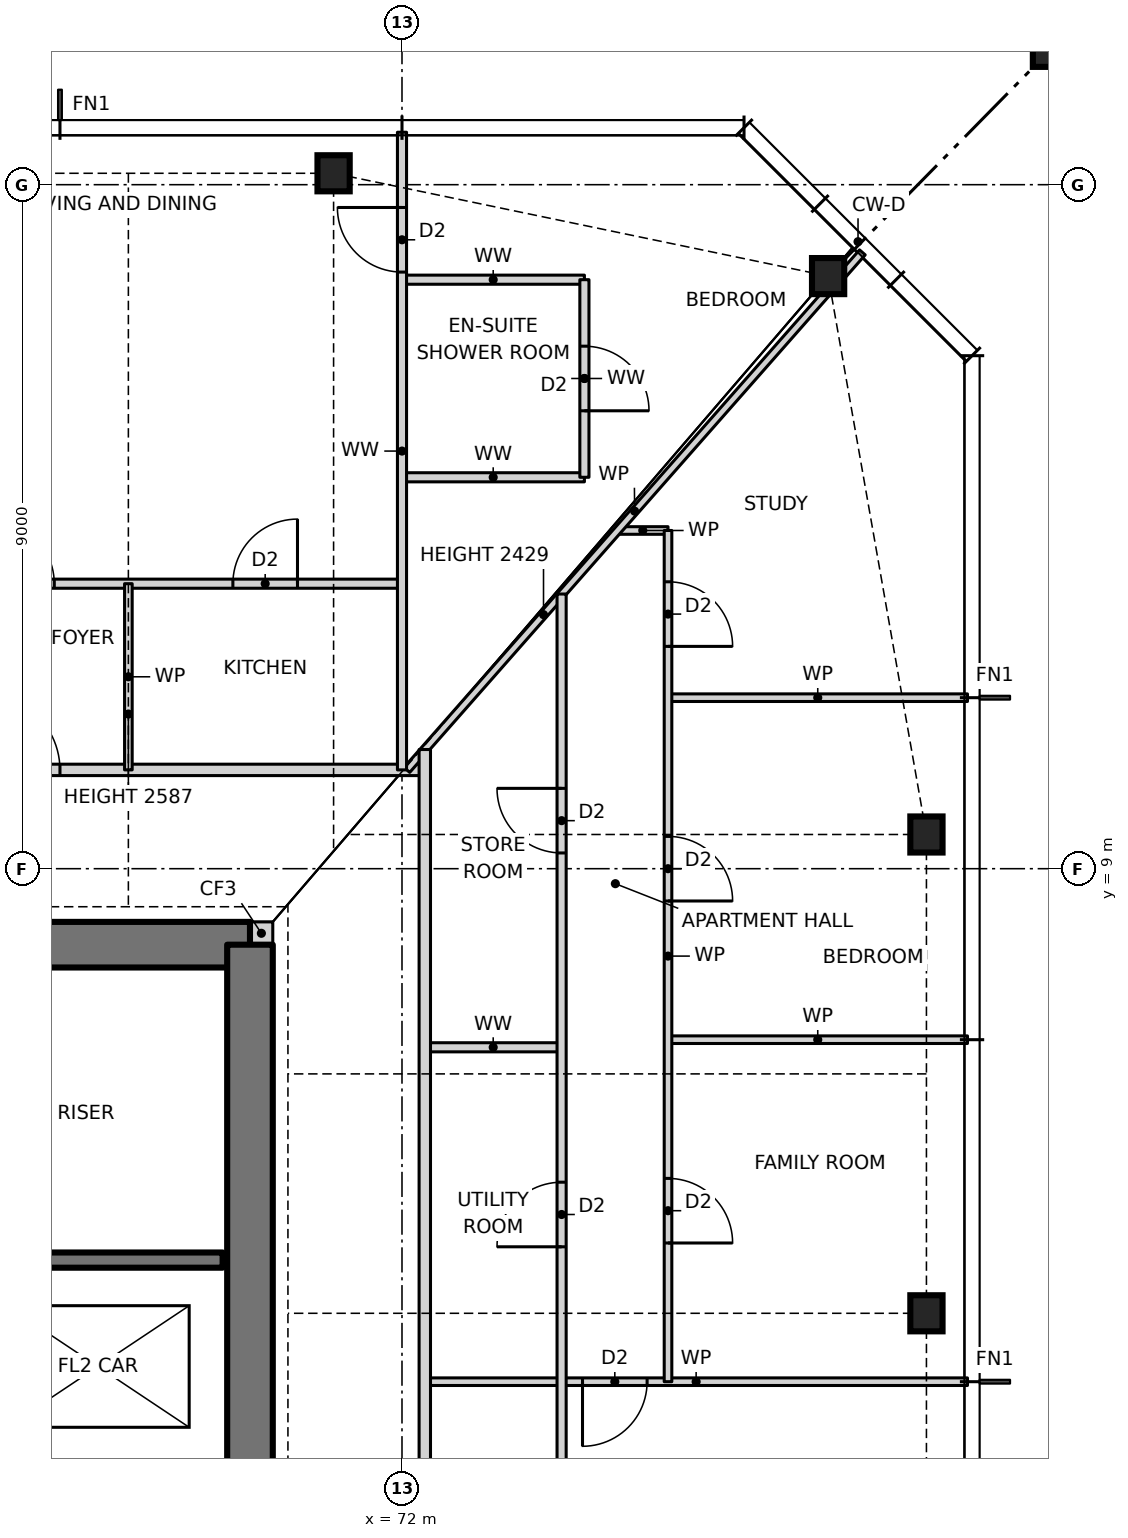
"""IFC4 building model, lengths in metres.
Left out: names, types, materials, properties, quantities, classifications, styles, units other than length and angle.
Written with IfcOpenShell. Run it as: python <this file> out.ifc"""

import sys

from ifc_helpers import new_model, si_unit, direction, frame, frame_2d, origin, origin_2d, place, context, subcontext, project, spatial, rectangle, hollow_rectangle, i_section, extrude, element, fill, save


model = new_model("IFC4")
c1 = context("Model", 3, precision=1e-05, world=origin(), true_north=direction((0.0, 1.0)))
c2 = subcontext(c1, "Body", "Model", "MODEL_VIEW")
j1 = project(units=[si_unit("LENGTHUNIT", "METRE"), si_unit("PLANEANGLEUNIT", "RADIAN")], contexts=[c1])
p1 = place(None, origin())
s1 = spatial("IfcSite", under=j1, at=p1, CompositionType="ELEMENT")
p2 = place(p1, origin())
s2 = spatial("IfcBuilding", under=s1, at=p2, CompositionType="ELEMENT")
p3 = place(p2, frame((0.0, 0.0, 64.0)))
s3 = spatial("IfcBuildingStorey", under=s2, at=p3, CompositionType="ELEMENT", Elevation=64.0)
for number, where, z_axis, x_axis in (
    (1, (78.9, 3.15, 0.0), (0.0, 0.0, 1.0), (1.0, 0.0, 0.0)),
    (2, (78.9, 9.45, 0.0), (0.0, 0.0, 1.0), (1.0, 0.0, 0.0)),
    (3, (77.606, 16.797, 0.0), (0.0, 0.0, 1.0), (1.0, 0.0, 0.0)),
    (4, (71.1, 18.15, 0.0), (0.0, 0.0, 1.0), (1.0, 0.0, 0.0)),
):
    element("IfcColumn", number, at=place(p3, frame(where, z_axis=z_axis, x_axis=x_axis)), inside=s3, PredefinedType="COLUMN", context=c2, shape_type="SweptSolid", body=[
        extrude(i_section(OverallWidth=0.424, OverallDepth=0.475, WebThickness=0.048, FlangeThickness=0.077, at=origin_2d()), origin(), (0.0, 0.0, 1.0), 3.5),
    ])
p4 = place(p3, frame((80.9, 20.15, 0.0), z_axis=(0.0, 0.0, 1.0), x_axis=(1.0, 0.0, 0.0)))
e5 = element("IfcColumn", 5, at=p4, inside=s3, PredefinedType="COLUMN", context=c2, shape_type="SweptSolid", body=[
    extrude(hollow_rectangle(XDim=1.2, YDim=1.2, WallThickness=0.07, at=origin_2d()), origin(), (0.0, 0.0, 1.0), 3.5),
])
p5 = place(p3, frame((70.0, 8.15, 0.0), z_axis=(0.0, 0.0, 1.0), x_axis=(1.0, 0.0, 0.0)))
e6 = element("IfcWall", 6, at=p5, inside=s3, PredefinedType="SOLIDWALL", context=c2, shape_type="SweptSolid", body=[
    extrude(rectangle(XDim=0.3, YDim=0.3, at=frame_2d((0.15, 0.0))), origin(), (0.0, 0.0, 1.0), 3.5),
])
p6 = place(p3, frame((70.0, 8.0, 0.0), z_axis=(0.0, 0.0, 1.0), x_axis=(-1.0, 0.0, 0.0)))
e7 = element("IfcWall", 7, at=p6, inside=s3, PredefinedType="SHEAR", context=c2, shape_type="SweptSolid", body=[
    extrude(rectangle(XDim=14.0, YDim=0.6, at=frame_2d((7.0, 0.0))), origin(), (0.0, 0.0, 1.0), 3.5),
])
p7 = place(p6, frame((8.2, 0.0, 0.0)))
e8 = element("IfcOpeningElement", 8, at=p7, cuts=e7, PredefinedType="OPENING", context=c2, shape_type="SweptSolid", body=[
    extrude(rectangle(XDim=0.9, YDim=2.1, at=frame_2d((0.45, 1.05))), frame((0.0, 0.31, 0.0), z_axis=(0.0, -1.0, 0.0), x_axis=(1.0, 0.0, 0.0)), (0.0, 0.0, 1.0), 0.62),
])
p8 = place(p6, frame((3.2, 0.0, 0.0)))
e9 = element("IfcOpeningElement", 9, at=p8, cuts=e7, PredefinedType="OPENING", context=c2, shape_type="SweptSolid", body=[
    extrude(rectangle(XDim=0.9, YDim=2.1, at=frame_2d((0.45, 1.05))), frame((0.0, 0.31, 0.0), z_axis=(0.0, -1.0, 0.0), x_axis=(1.0, 0.0, 0.0)), (0.0, 0.0, 1.0), 0.62),
])
p9 = place(p3, frame((70.0, -8.0, 0.0), z_axis=(0.0, 0.0, 1.0), x_axis=(0.0, 1.0, 0.0)))
e10 = element("IfcWall", 10, at=p9, inside=s3, PredefinedType="SHEAR", context=c2, shape_type="SweptSolid", body=[
    extrude(rectangle(XDim=16.0, YDim=0.6, at=frame_2d((8.0, 0.0))), origin(), (0.0, 0.0, 1.0), 3.5),
])
p10 = place(p9, frame((7.5, 0.0, 0.0)))
e11 = element("IfcOpeningElement", 11, at=p10, cuts=e10, PredefinedType="OPENING", context=c2, shape_type="SweptSolid", body=[
    extrude(rectangle(XDim=1.0, YDim=2.1, at=frame_2d((0.5, 1.05))), frame((0.0, 0.31, 0.0), z_axis=(0.0, -1.0, 0.0), x_axis=(1.0, 0.0, 0.0)), (0.0, 0.0, 1.0), 0.62),
])
p11 = place(p3, frame((72.3, 2.25, 0.0), z_axis=(0.0, 0.0, 1.0), x_axis=(1.0, 0.0, 0.0)))
e12 = element("IfcWall", 12, at=p11, inside=s3, PredefinedType="PARTITIONING", context=c2, shape_type="SweptSolid", body=[
    extrude(rectangle(XDim=7.14, YDim=0.1, at=frame_2d((3.57, 0.0))), origin(), (0.0, 0.0, 1.0), 3.27),
])
p12 = place(p11, frame((2.075, 0.0, 0.0)))
e13 = element("IfcOpeningElement", 13, at=p12, cuts=e12, PredefinedType="OPENING", context=c2, shape_type="SweptSolid", body=[
    extrude(rectangle(XDim=0.85, YDim=2.1, at=frame_2d((0.425, 1.05))), frame((0.0, 0.06, 0.0), z_axis=(0.0, -1.0, 0.0), x_axis=(1.0, 0.0, 0.0)), (0.0, 0.0, 1.0), 0.12),
])
p13 = place(p3, frame((59.7, 3.85, 0.0), z_axis=(0.0, 0.0, 1.0), x_axis=(1.0, 0.0, 0.0)))
e14 = element("IfcWall", 14, at=p13, inside=s3, PredefinedType="SOLIDWALL", context=c2, shape_type="SweptSolid", body=[
    extrude(rectangle(XDim=9.94, YDim=0.2, at=frame_2d((4.97, 0.0))), origin(), (0.0, 0.0, 1.0), 3.5),
])
p14 = place(p3, frame((72.3, 6.65, 0.0), z_axis=(0.0, 0.0, 1.0), x_axis=(1.0, 0.0, 0.0)))
e15 = element("IfcWall", 15, at=p14, inside=s3, PredefinedType="PARTITIONING", context=c2, shape_type="SweptSolid", body=[
    extrude(rectangle(XDim=1.8, YDim=0.12, at=frame_2d((0.9, 0.0))), origin(), (0.0, 0.0, 1.0), 3.27),
])
p15 = place(p3, frame((75.5, 6.75, 0.0), z_axis=(0.0, 0.0, 1.0), x_axis=(1.0, 0.0, 0.0)))
e16 = element("IfcWall", 16, at=p15, inside=s3, PredefinedType="PARTITIONING", context=c2, shape_type="SweptSolid", body=[
    extrude(rectangle(XDim=3.94, YDim=0.1, at=frame_2d((1.97, 0.0))), origin(), (0.0, 0.0, 1.0), 3.27),
])
p16 = place(p3, frame((53.7, 10.3, 0.0), z_axis=(0.0, 0.0, 1.0), x_axis=(1.0, 0.0, 0.0)))
e17 = element("IfcWall", 17, at=p16, inside=s3, PredefinedType="PARTITIONING", context=c2, shape_type="SweptSolid", body=[
    extrude(rectangle(XDim=18.6, YDim=0.15, at=frame_2d((9.3, 0.0))), origin(), (0.0, 0.0, 1.0), 3.27),
])
p17 = place(p16, frame((12.8, 0.0, 0.0)))
e18 = element("IfcOpeningElement", 18, at=p17, cuts=e17, PredefinedType="OPENING", context=c2, shape_type="SweptSolid", body=[
    extrude(rectangle(XDim=1.0, YDim=2.1, at=frame_2d((0.5, 1.05))), frame((0.0, 0.085, 0.0), z_axis=(0.0, -1.0, 0.0), x_axis=(1.0, 0.0, 0.0)), (0.0, 0.0, 1.0), 0.17),
])
p18 = place(p3, frame((75.5, 11.25, 0.0), z_axis=(0.0, 0.0, 1.0), x_axis=(1.0, 0.0, 0.0)))
e19 = element("IfcWall", 19, at=p18, inside=s3, PredefinedType="PARTITIONING", context=c2, shape_type="SweptSolid", body=[
    extrude(rectangle(XDim=3.94, YDim=0.1, at=frame_2d((1.97, 0.0))), origin(), (0.0, 0.0, 1.0), 3.27),
])
p19 = place(p3, frame((51.8, 12.75, 0.0), z_axis=(0.0, 0.0, 1.0), x_axis=(1.0, 0.0, 0.0)))
e20 = element("IfcWall", 20, at=p19, inside=s3, PredefinedType="PARTITIONING", context=c2, shape_type="SweptSolid", body=[
    extrude(rectangle(XDim=20.2, YDim=0.12, at=frame_2d((10.1, 0.0))), origin(), (0.0, 0.0, 1.0), 3.27),
])
p20 = place(p19, frame((17.975, 0.0, 0.0)))
e21 = element("IfcOpeningElement", 21, at=p20, cuts=e20, PredefinedType="OPENING", context=c2, shape_type="SweptSolid", body=[
    extrude(rectangle(XDim=0.85, YDim=2.1, at=frame_2d((0.425, 1.05))), frame((0.0, 0.07, 0.0), z_axis=(0.0, -1.0, 0.0), x_axis=(1.0, 0.0, 0.0)), (0.0, 0.0, 1.0), 0.14),
])
p21 = place(p19, frame((14.775, 0.0, 0.0)))
e22 = element("IfcOpeningElement", 22, at=p21, cuts=e20, PredefinedType="OPENING", context=c2, shape_type="SweptSolid", body=[
    extrude(rectangle(XDim=0.85, YDim=2.1, at=frame_2d((0.425, 1.05))), frame((0.0, 0.07, 0.0), z_axis=(0.0, -1.0, 0.0), x_axis=(1.0, 0.0, 0.0)), (0.0, 0.0, 1.0), 0.14),
])
p22 = place(p19, frame((9.125, 0.0, 0.0)))
e23 = element("IfcOpeningElement", 23, at=p22, cuts=e20, PredefinedType="OPENING", context=c2, shape_type="SweptSolid", body=[
    extrude(rectangle(XDim=0.85, YDim=2.1, at=frame_2d((0.425, 1.05))), frame((0.0, 0.07, 0.0), z_axis=(0.0, -1.0, 0.0), x_axis=(1.0, 0.0, 0.0)), (0.0, 0.0, 1.0), 0.14),
])
p23 = place(p19, frame((3.525, 0.0, 0.0)))
e24 = element("IfcOpeningElement", 24, at=p23, cuts=e20, PredefinedType="OPENING", context=c2, shape_type="SweptSolid", body=[
    extrude(rectangle(XDim=0.85, YDim=2.1, at=frame_2d((0.425, 1.05))), frame((0.0, 0.07, 0.0), z_axis=(0.0, -1.0, 0.0), x_axis=(1.0, 0.0, 0.0)), (0.0, 0.0, 1.0), 0.14),
])
p24 = place(p3, frame((74.836, 13.45, 0.0), z_axis=(0.0, 0.0, 1.0), x_axis=(1.0, 0.0, 0.0)))
e25 = element("IfcWall", 25, at=p24, inside=s3, PredefinedType="PARTITIONING", context=c2, shape_type="SweptSolid", body=[
    extrude(rectangle(XDim=0.664, YDim=0.1, at=frame_2d((0.332, 0.0))), origin(), (0.0, 0.0, 1.0), 3.27),
])
for number, where, z_axis, x_axis in (
    (26, (72.0, 14.15, 0.0), (0.0, 0.0, 1.0), (1.0, 0.0, 0.0)),
    (27, (72.0, 16.75, 0.0), (0.0, 0.0, 1.0), (1.0, 0.0, 0.0)),
):
    element("IfcWall", number, at=place(p3, frame(where, z_axis=z_axis, x_axis=x_axis)), inside=s3, PredefinedType="PARTITIONING", context=c2, shape_type="SweptSolid", body=[
        extrude(rectangle(XDim=2.4, YDim=0.12, at=frame_2d((1.2, 0.0))), origin(), (0.0, 0.0, 1.0), 3.27),
    ])
p25 = place(p3, frame((72.064, 10.3, 0.0), z_axis=(0.0, 0.0, 1.0), x_axis=(0.660700699661, 0.750649442461, 0.0)))
e28 = element("IfcWall", 28, at=p25, inside=s3, PredefinedType="PARTITIONING", context=c2, shape_type="SweptSolid", body=[
    extrude(rectangle(XDim=9.071, YDim=0.1, at=frame_2d((4.535, 0.0))), origin(), (0.0, 0.0, 1.0), 2.429),
])
p26 = place(p3, frame((75.5, 2.25, 0.0), z_axis=(0.0, 0.0, 1.0), x_axis=(0.0, 1.0, 0.0)))
e29 = element("IfcWall", 29, at=p26, inside=s3, PredefinedType="PARTITIONING", context=c2, shape_type="SweptSolid", body=[
    extrude(rectangle(XDim=11.2, YDim=0.1, at=frame_2d((5.6, 0.0))), origin(), (0.0, 0.0, 1.0), 3.27),
])
p27 = place(p26, frame((1.825, 0.0, 0.0)))
e30 = element("IfcOpeningElement", 30, at=p27, cuts=e29, PredefinedType="OPENING", context=c2, shape_type="SweptSolid", body=[
    extrude(rectangle(XDim=0.85, YDim=2.1, at=frame_2d((0.425, 1.05))), frame((0.0, 0.06, 0.0), z_axis=(0.0, -1.0, 0.0), x_axis=(1.0, 0.0, 0.0)), (0.0, 0.0, 1.0), 0.12),
])
p28 = place(p26, frame((6.325, 0.0, 0.0)))
e31 = element("IfcOpeningElement", 31, at=p28, cuts=e29, PredefinedType="OPENING", context=c2, shape_type="SweptSolid", body=[
    extrude(rectangle(XDim=0.85, YDim=2.1, at=frame_2d((0.425, 1.05))), frame((0.0, 0.06, 0.0), z_axis=(0.0, -1.0, 0.0), x_axis=(1.0, 0.0, 0.0)), (0.0, 0.0, 1.0), 0.12),
])
p29 = place(p26, frame((9.675, 0.0, 0.0)))
e32 = element("IfcOpeningElement", 32, at=p29, cuts=e29, PredefinedType="OPENING", context=c2, shape_type="SweptSolid", body=[
    extrude(rectangle(XDim=0.85, YDim=2.1, at=frame_2d((0.425, 1.05))), frame((0.0, 0.06, 0.0), z_axis=(0.0, -1.0, 0.0), x_axis=(1.0, 0.0, 0.0)), (0.0, 0.0, 1.0), 0.12),
])
p30 = place(p3, frame((74.4, 14.15, 0.0), z_axis=(0.0, 0.0, 1.0), x_axis=(0.0, 1.0, 0.0)))
e33 = element("IfcWall", 33, at=p30, inside=s3, PredefinedType="PARTITIONING", context=c2, shape_type="SweptSolid", body=[
    extrude(rectangle(XDim=2.6, YDim=0.12, at=frame_2d((1.3, 0.0))), origin(), (0.0, 0.0, 1.0), 3.27),
])
p31 = place(p30, frame((0.875, 0.0, 0.0)))
e34 = element("IfcOpeningElement", 34, at=p31, cuts=e33, PredefinedType="OPENING", context=c2, shape_type="SweptSolid", body=[
    extrude(rectangle(XDim=0.85, YDim=2.1, at=frame_2d((0.425, 1.05))), frame((0.0, 0.07, 0.0), z_axis=(0.0, -1.0, 0.0), x_axis=(1.0, 0.0, 0.0)), (0.0, 0.0, 1.0), 0.14),
])
p32 = place(p3, frame((74.1, -12.614, 0.0), z_axis=(0.0, 0.0, 1.0), x_axis=(0.0, 1.0, 0.0)))
e35 = element("IfcWall", 35, at=p32, inside=s3, PredefinedType="PARTITIONING", context=c2, shape_type="SweptSolid", body=[
    extrude(rectangle(XDim=25.228, YDim=0.12, at=frame_2d((12.614, 0.0))), origin(), (0.0, 0.0, 1.0), 3.27),
])
p33 = place(p32, frame((7.239, 0.0, 0.0)))
e36 = element("IfcOpeningElement", 36, at=p33, cuts=e35, PredefinedType="OPENING", context=c2, shape_type="SweptSolid", body=[
    extrude(rectangle(XDim=0.85, YDim=2.1, at=frame_2d((0.425, 1.05))), frame((0.0, 0.07, 0.0), z_axis=(0.0, -1.0, 0.0), x_axis=(1.0, 0.0, 0.0)), (0.0, 0.0, 1.0), 0.14),
])
p34 = place(p32, frame((10.439, 0.0, 0.0)))
e37 = element("IfcOpeningElement", 37, at=p34, cuts=e35, PredefinedType="OPENING", context=c2, shape_type="SweptSolid", body=[
    extrude(rectangle(XDim=0.85, YDim=2.1, at=frame_2d((0.425, 1.05))), frame((0.0, 0.07, 0.0), z_axis=(0.0, -1.0, 0.0), x_axis=(1.0, 0.0, 0.0)), (0.0, 0.0, 1.0), 0.14),
])
p35 = place(p32, frame((2.507, 0.0, 0.0)))
e38 = element("IfcOpeningElement", 38, at=p35, cuts=e35, PredefinedType="OPENING", context=c2, shape_type="SweptSolid", body=[
    extrude(rectangle(XDim=0.85, YDim=2.1, at=frame_2d((0.425, 1.05))), frame((0.0, 0.07, 0.0), z_axis=(0.0, -1.0, 0.0), x_axis=(1.0, 0.0, 0.0)), (0.0, 0.0, 1.0), 0.14),
])
p36 = place(p32, frame((16.639, 0.0, 0.0)))
e39 = element("IfcOpeningElement", 39, at=p36, cuts=e35, PredefinedType="OPENING", context=c2, shape_type="SweptSolid", body=[
    extrude(rectangle(XDim=0.85, YDim=2.1, at=frame_2d((0.425, 1.05))), frame((0.0, 0.07, 0.0), z_axis=(0.0, -1.0, 0.0), x_axis=(1.0, 0.0, 0.0)), (0.0, 0.0, 1.0), 0.14),
])
p37 = place(p32, frame((21.821, 0.0, 0.0)))
e40 = element("IfcOpeningElement", 40, at=p37, cuts=e35, PredefinedType="OPENING", context=c2, shape_type="SweptSolid", body=[
    extrude(rectangle(XDim=0.85, YDim=2.1, at=frame_2d((0.425, 1.05))), frame((0.0, 0.07, 0.0), z_axis=(0.0, -1.0, 0.0), x_axis=(1.0, 0.0, 0.0)), (0.0, 0.0, 1.0), 0.14),
])
p38 = place(p3, frame((72.3, -10.9, 0.0), z_axis=(0.0, 0.0, 1.0), x_axis=(0.0, 1.0, 0.0)))
e41 = element("IfcWall", 41, at=p38, inside=s3, PredefinedType="PARTITIONING", context=c2, shape_type="SweptSolid", body=[
    extrude(rectangle(XDim=21.468, YDim=0.15, at=frame_2d((10.734, 0.0))), origin(), (0.0, 0.0, 1.0), 3.27),
])
p39 = place(p38, frame((8.65, 0.0, 0.0)))
e42 = element("IfcOpeningElement", 42, at=p39, cuts=e41, PredefinedType="OPENING", context=c2, shape_type="SweptSolid", body=[
    extrude(rectangle(XDim=1.0, YDim=2.1, at=frame_2d((0.5, 1.05))), frame((0.0, 0.085, 0.0), z_axis=(0.0, -1.0, 0.0), x_axis=(1.0, 0.0, 0.0)), (0.0, 0.0, 1.0), 0.17),
])
p40 = place(p3, frame((72.0, 10.3, 0.0), z_axis=(0.0, 0.0, 1.0), x_axis=(0.0, 1.0, 0.0)))
e43 = element("IfcWall", 43, at=p40, inside=s3, PredefinedType="PARTITIONING", context=c2, shape_type="SweptSolid", body=[
    extrude(rectangle(XDim=8.39, YDim=0.12, at=frame_2d((4.195, 0.0))), origin(), (0.0, 0.0, 1.0), 3.27),
])
p41 = place(p40, frame((6.55, 0.0, 0.0)))
e44 = element("IfcOpeningElement", 44, at=p41, cuts=e43, PredefinedType="OPENING", context=c2, shape_type="SweptSolid", body=[
    extrude(rectangle(XDim=0.85, YDim=2.1, at=frame_2d((0.425, 1.05))), frame((0.0, 0.07, 0.0), z_axis=(0.0, -1.0, 0.0), x_axis=(1.0, 0.0, 0.0)), (0.0, 0.0, 1.0), 0.14),
])
p42 = place(p3, frame((68.4, 10.3, 0.0), z_axis=(0.0, 0.0, 1.0), x_axis=(0.0, 1.0, 0.0)))
e45 = element("IfcWall", 45, at=p42, inside=s3, PredefinedType="PARTITIONING", context=c2, shape_type="SweptSolid", body=[
    extrude(rectangle(XDim=2.45, YDim=0.1, at=frame_2d((1.225, 0.0))), origin(), (0.0, 0.0, 1.0), 2.587),
])
p43 = place(p12, frame((0.85, 0.0, 0.0), z_axis=(0.0, 0.0, 1.0), x_axis=(-1.0, 0.0, 0.0)))
e46 = element("IfcDoor", 46, at=p43, inside=s3, OperationType="SINGLE_SWING_RIGHT", PredefinedType="DOOR", context=c2, shape_type="SweptSolid", body=[
    extrude(rectangle(XDim=0.85, YDim=2.1, at=frame_2d((0.425, 1.05))), frame((0.0, 0.025, 0.0), z_axis=(0.0, -1.0, 0.0), x_axis=(1.0, 0.0, 0.0)), (0.0, 0.0, 1.0), 0.05),
])
fill(e13, e46)
p44 = place(p27, frame((0.85, 0.0, 0.0), z_axis=(0.0, 0.0, 1.0), x_axis=(-1.0, 0.0, 0.0)))
e47 = element("IfcDoor", 47, at=p44, inside=s3, OperationType="SINGLE_SWING_RIGHT", PredefinedType="DOOR", context=c2, shape_type="SweptSolid", body=[
    extrude(rectangle(XDim=0.85, YDim=2.1, at=frame_2d((0.425, 1.05))), frame((0.0, 0.025, 0.0), z_axis=(0.0, -1.0, 0.0), x_axis=(1.0, 0.0, 0.0)), (0.0, 0.0, 1.0), 0.05),
])
fill(e30, e47)
p45 = place(p28, frame((0.85, 0.0, 0.0), z_axis=(0.0, 0.0, 1.0), x_axis=(-1.0, 0.0, 0.0)))
e48 = element("IfcDoor", 48, at=p45, inside=s3, OperationType="SINGLE_SWING_RIGHT", PredefinedType="DOOR", context=c2, shape_type="SweptSolid", body=[
    extrude(rectangle(XDim=0.85, YDim=2.1, at=frame_2d((0.425, 1.05))), frame((0.0, 0.025, 0.0), z_axis=(0.0, -1.0, 0.0), x_axis=(1.0, 0.0, 0.0)), (0.0, 0.0, 1.0), 0.05),
])
fill(e31, e48)
p46 = place(p29, frame((0.85, 0.0, 0.0), z_axis=(0.0, 0.0, 1.0), x_axis=(-1.0, 0.0, 0.0)))
e49 = element("IfcDoor", 49, at=p46, inside=s3, OperationType="SINGLE_SWING_RIGHT", PredefinedType="DOOR", context=c2, shape_type="SweptSolid", body=[
    extrude(rectangle(XDim=0.85, YDim=2.1, at=frame_2d((0.425, 1.05))), frame((0.0, 0.025, 0.0), z_axis=(0.0, -1.0, 0.0), x_axis=(1.0, 0.0, 0.0)), (0.0, 0.0, 1.0), 0.05),
])
fill(e32, e49)
p47 = place(p36, origin())
e50 = element("IfcDoor", 50, at=p47, inside=s3, OperationType="SINGLE_SWING_LEFT", PredefinedType="DOOR", context=c2, shape_type="SweptSolid", body=[
    extrude(rectangle(XDim=0.85, YDim=2.1, at=frame_2d((0.425, 1.05))), frame((0.0, 0.025, 0.0), z_axis=(0.0, -1.0, 0.0), x_axis=(1.0, 0.0, 0.0)), (0.0, 0.0, 1.0), 0.05),
])
fill(e39, e50)
p48 = place(p37, origin())
e51 = element("IfcDoor", 51, at=p48, inside=s3, OperationType="SINGLE_SWING_RIGHT", PredefinedType="DOOR", context=c2, shape_type="SweptSolid", body=[
    extrude(rectangle(XDim=0.85, YDim=2.1, at=frame_2d((0.425, 1.05))), frame((0.0, 0.025, 0.0), z_axis=(0.0, -1.0, 0.0), x_axis=(1.0, 0.0, 0.0)), (0.0, 0.0, 1.0), 0.05),
])
fill(e40, e51)
p49 = place(p20, origin())
e52 = element("IfcDoor", 52, at=p49, inside=s3, OperationType="SINGLE_SWING_RIGHT", PredefinedType="DOOR", context=c2, shape_type="SweptSolid", body=[
    extrude(rectangle(XDim=0.85, YDim=2.1, at=frame_2d((0.425, 1.05))), frame((0.0, 0.025, 0.0), z_axis=(0.0, -1.0, 0.0), x_axis=(1.0, 0.0, 0.0)), (0.0, 0.0, 1.0), 0.05),
])
fill(e21, e52)
p50 = place(p17, origin())
e53 = element("IfcDoor", 53, at=p50, inside=s3, OperationType="SINGLE_SWING_LEFT", PredefinedType="DOOR", context=c2, shape_type="SweptSolid", body=[
    extrude(rectangle(XDim=1.0, YDim=2.1, at=frame_2d((0.5, 1.05))), frame((0.0, 0.025, 0.0), z_axis=(0.0, -1.0, 0.0), x_axis=(1.0, 0.0, 0.0)), (0.0, 0.0, 1.0), 0.05),
])
fill(e18, e53)
p51 = place(p21, origin())
e54 = element("IfcDoor", 54, at=p51, inside=s3, OperationType="SINGLE_SWING_LEFT", PredefinedType="DOOR", context=c2, shape_type="SweptSolid", body=[
    extrude(rectangle(XDim=0.85, YDim=2.1, at=frame_2d((0.425, 1.05))), frame((0.0, 0.025, 0.0), z_axis=(0.0, -1.0, 0.0), x_axis=(1.0, 0.0, 0.0)), (0.0, 0.0, 1.0), 0.05),
])
fill(e22, e54)
p52 = place(p31, frame((0.85, 0.0, 0.0), z_axis=(0.0, 0.0, 1.0), x_axis=(-1.0, 0.0, 0.0)))
e55 = element("IfcDoor", 55, at=p52, inside=s3, OperationType="SINGLE_SWING_RIGHT", PredefinedType="DOOR", context=c2, shape_type="SweptSolid", body=[
    extrude(rectangle(XDim=0.85, YDim=2.1, at=frame_2d((0.425, 1.05))), frame((0.0, 0.025, 0.0), z_axis=(0.0, -1.0, 0.0), x_axis=(1.0, 0.0, 0.0)), (0.0, 0.0, 1.0), 0.05),
])
fill(e34, e55)
p53 = place(p41, origin())
e56 = element("IfcDoor", 56, at=p53, inside=s3, OperationType="SINGLE_SWING_RIGHT", PredefinedType="DOOR", context=c2, shape_type="SweptSolid", body=[
    extrude(rectangle(XDim=0.85, YDim=2.1, at=frame_2d((0.425, 1.05))), frame((0.0, 0.025, 0.0), z_axis=(0.0, -1.0, 0.0), x_axis=(1.0, 0.0, 0.0)), (0.0, 0.0, 1.0), 0.05),
])
fill(e44, e56)
save(model, sys.argv[1])
